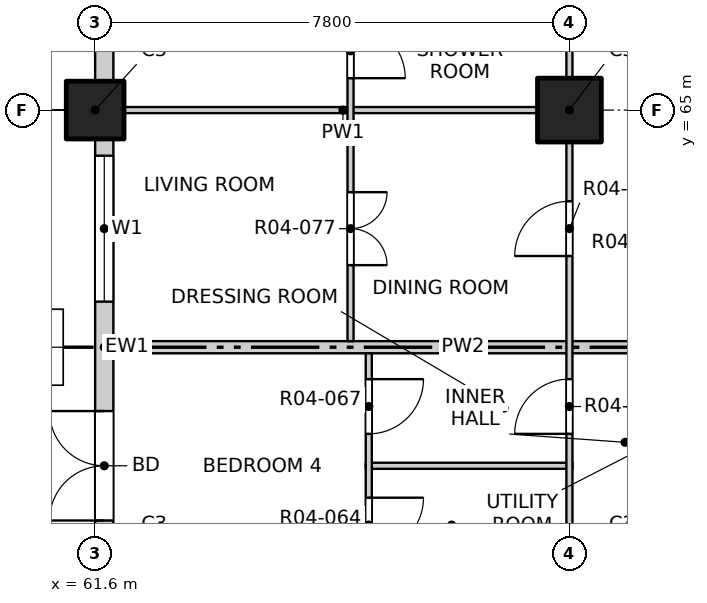
"""IFC4 building model, lengths in metres.
Left out: names, types, materials, properties, quantities, classifications, styles, units other than length and angle.
Written with IfcOpenShell. Run it as: python <this file> out.ifc"""

import sys

from ifc_helpers import new_model, si_unit, direction, frame, frame_2d, origin, origin_2d, place, context, subcontext, project, spatial, rectangle, extrude, element, fill, save


model = new_model("IFC4")
c1 = context("Model", 3, precision=1e-05, world=origin(), true_north=direction((0.0, 1.0)))
c2 = subcontext(c1, "Body", "Model", "MODEL_VIEW")
j1 = project(units=[si_unit("LENGTHUNIT", "METRE"), si_unit("PLANEANGLEUNIT", "RADIAN")], contexts=[c1])
p1 = place(None, origin())
s1 = spatial("IfcSite", under=j1, at=p1, CompositionType="ELEMENT")
p2 = place(p1, origin())
s2 = spatial("IfcBuilding", under=s1, at=p2, CompositionType="ELEMENT")
p3 = place(p2, frame((0.0, 0.0, 58.0)))
s3 = spatial("IfcBuildingStorey", under=s2, at=p3, CompositionType="ELEMENT", Elevation=58.0)
p4 = place(p3, frame((61.6, 65.0, -0.25), z_axis=(0.0, 0.0, 1.0), x_axis=(1.0, 0.0, 0.0)))
e1 = element("IfcColumn", 1, at=p4, inside=s3, PredefinedType="COLUMN", context=c2, shape_type="SweptSolid", body=[
    extrude(rectangle(XDim=0.95, YDim=0.95, at=origin_2d()), origin(), (0.0, 0.0, 1.0), 3.4),
])
p5 = place(p3, frame((69.4, 65.0, -0.25), z_axis=(0.0, 0.0, 1.0), x_axis=(1.0, 0.0, 0.0)))
e2 = element("IfcColumn", 2, at=p5, inside=s3, PredefinedType="COLUMN", context=c2, shape_type="SweptSolid", body=[
    extrude(rectangle(XDim=1.05, YDim=1.05, at=origin_2d()), origin(), (0.0, 0.0, 1.0), 3.4),
])
p6 = place(p3, frame((61.75, 57.675, 0.0), z_axis=(0.0, 0.0, 1.0), x_axis=(0.0, 1.0, 0.0)))
e3 = element("IfcWall", 3, at=p6, inside=s3, PredefinedType="SOLIDWALL", context=c2, shape_type="SweptSolid", body=[
    extrude(rectangle(XDim=6.85, YDim=0.3, at=frame_2d((3.425, 0.0))), origin(), (0.0, 0.0, 1.0), 2.7),
])
p7 = place(p6, frame((0.575, 0.0, 0.0)))
e4 = element("IfcOpeningElement", 4, at=p7, cuts=e3, PredefinedType="OPENING", context=c2, shape_type="SweptSolid", body=[
    extrude(rectangle(XDim=1.8, YDim=2.4, at=frame_2d((0.9, 1.2))), frame((0.0, 0.16, 0.0), z_axis=(0.0, -1.0, 0.0), x_axis=(1.0, 0.0, 0.0)), (0.0, 0.0, 1.0), 0.32),
])
p8 = place(p6, frame((4.175, 0.0, 0.9)))
e5 = element("IfcOpeningElement", 5, at=p8, cuts=e3, PredefinedType="OPENING", context=c2, shape_type="SweptSolid", body=[
    extrude(rectangle(XDim=2.4, YDim=1.8, at=frame_2d((1.2, 0.9))), frame((0.0, 0.16, 0.0), z_axis=(0.0, -1.0, 0.0), x_axis=(1.0, 0.0, 0.0)), (0.0, 0.0, 1.0), 0.32),
])
p9 = place(p3, frame((61.75, 65.475, 0.0), z_axis=(0.0, 0.0, 1.0), x_axis=(0.0, 1.0, 0.0)))
e6 = element("IfcWall", 6, at=p9, inside=s3, PredefinedType="SOLIDWALL", context=c2, shape_type="SweptSolid", body=[
    extrude(rectangle(XDim=6.85, YDim=0.3, at=frame_2d((3.425, 0.0))), origin(), (0.0, 0.0, 1.0), 2.7),
])
p10 = place(p9, frame((0.575, 0.0, 0.0)))
e7 = element("IfcOpeningElement", 7, at=p10, cuts=e6, PredefinedType="OPENING", context=c2, shape_type="SweptSolid", body=[
    extrude(rectangle(XDim=1.8, YDim=2.4, at=frame_2d((0.9, 1.2))), frame((0.0, 0.16, 0.0), z_axis=(0.0, -1.0, 0.0), x_axis=(1.0, 0.0, 0.0)), (0.0, 0.0, 1.0), 0.32),
])
p11 = place(p9, frame((4.175, 0.0, 0.9)))
e8 = element("IfcOpeningElement", 8, at=p11, cuts=e6, PredefinedType="OPENING", context=c2, shape_type="SweptSolid", body=[
    extrude(rectangle(XDim=2.4, YDim=1.8, at=frame_2d((1.2, 0.9))), frame((0.0, 0.16, 0.0), z_axis=(0.0, -1.0, 0.0), x_axis=(1.0, 0.0, 0.0)), (0.0, 0.0, 1.0), 0.32),
])
p12 = place(p3, frame((66.05, 59.15, 0.0), z_axis=(0.0, 0.0, 1.0), x_axis=(1.0, 0.0, 0.0)))
e9 = element("IfcWall", 9, at=p12, inside=s3, PredefinedType="PARTITIONING", context=c2, shape_type="SweptSolid", body=[
    extrude(rectangle(XDim=3.4, YDim=0.1, at=frame_2d((1.7, 0.0))), origin(), (0.0, 0.0, 1.0), 3.15),
])
p13 = place(p3, frame((61.9, 61.1, 0.0), z_axis=(0.0, 0.0, 1.0), x_axis=(1.0, 0.0, 0.0)))
e10 = element("IfcWall", 10, at=p13, inside=s3, PredefinedType="PARTITIONING", context=c2, shape_type="SweptSolid", body=[
    extrude(rectangle(XDim=11.5, YDim=0.2, at=frame_2d((5.75, 0.0))), origin(), (0.0, 0.0, 1.0), 3.15),
])
p14 = place(p3, frame((61.9, 65.0, 0.0), z_axis=(0.0, 0.0, 1.0), x_axis=(1.0, 0.0, 0.0)))
e11 = element("IfcWall", 11, at=p14, inside=s3, PredefinedType="PARTITIONING", context=c2, shape_type="SweptSolid", body=[
    extrude(rectangle(XDim=7.55, YDim=0.1, at=frame_2d((3.775, 0.0))), origin(), (0.0, 0.0, 1.0), 2.55),
])
p15 = place(p3, frame((65.8, 61.2, 0.0), z_axis=(0.0, 0.0, 1.0), x_axis=(0.0, 1.0, 0.0)))
e12 = element("IfcWall", 12, at=p15, inside=s3, PredefinedType="PARTITIONING", context=c2, shape_type="SweptSolid", body=[
    extrude(rectangle(XDim=15.4, YDim=0.1, at=frame_2d((7.7, 0.0))), origin(), (0.0, 0.0, 1.0), 3.15),
])
p16 = place(p15, frame((1.25, 0.0, 0.0)))
e13 = element("IfcOpeningElement", 13, at=p16, cuts=e12, PredefinedType="OPENING", context=c2, shape_type="SweptSolid", body=[
    extrude(rectangle(XDim=1.2, YDim=2.1, at=frame_2d((0.6, 1.05))), frame((0.0, 0.06, 0.0), z_axis=(0.0, -1.0, 0.0), x_axis=(1.0, 0.0, 0.0)), (0.0, 0.0, 1.0), 0.12),
])
p17 = place(p15, frame((4.325, 0.0, 0.0)))
e14 = element("IfcOpeningElement", 14, at=p17, cuts=e12, PredefinedType="OPENING", context=c2, shape_type="SweptSolid", body=[
    extrude(rectangle(XDim=0.9, YDim=2.1, at=frame_2d((0.45, 1.05))), frame((0.0, 0.06, 0.0), z_axis=(0.0, -1.0, 0.0), x_axis=(1.0, 0.0, 0.0)), (0.0, 0.0, 1.0), 0.12),
])
p18 = place(p15, frame((6.275, 0.0, 0.0)))
e15 = element("IfcOpeningElement", 15, at=p18, cuts=e12, PredefinedType="OPENING", context=c2, shape_type="SweptSolid", body=[
    extrude(rectangle(XDim=0.9, YDim=2.1, at=frame_2d((0.45, 1.05))), frame((0.0, 0.06, 0.0), z_axis=(0.0, -1.0, 0.0), x_axis=(1.0, 0.0, 0.0)), (0.0, 0.0, 1.0), 0.12),
])
p19 = place(p15, frame((8.225, 0.0, 0.0)))
e16 = element("IfcOpeningElement", 16, at=p19, cuts=e12, PredefinedType="OPENING", context=c2, shape_type="SweptSolid", body=[
    extrude(rectangle(XDim=0.9, YDim=2.1, at=frame_2d((0.45, 1.05))), frame((0.0, 0.06, 0.0), z_axis=(0.0, -1.0, 0.0), x_axis=(1.0, 0.0, 0.0)), (0.0, 0.0, 1.0), 0.12),
])
p20 = place(p15, frame((10.175, 0.0, 0.0)))
e17 = element("IfcOpeningElement", 17, at=p20, cuts=e12, PredefinedType="OPENING", context=c2, shape_type="SweptSolid", body=[
    extrude(rectangle(XDim=0.9, YDim=2.1, at=frame_2d((0.45, 1.05))), frame((0.0, 0.06, 0.0), z_axis=(0.0, -1.0, 0.0), x_axis=(1.0, 0.0, 0.0)), (0.0, 0.0, 1.0), 0.12),
])
p21 = place(p15, frame((12.125, 0.0, 0.0)))
e18 = element("IfcOpeningElement", 18, at=p21, cuts=e12, PredefinedType="OPENING", context=c2, shape_type="SweptSolid", body=[
    extrude(rectangle(XDim=0.9, YDim=2.1, at=frame_2d((0.45, 1.05))), frame((0.0, 0.06, 0.0), z_axis=(0.0, -1.0, 0.0), x_axis=(1.0, 0.0, 0.0)), (0.0, 0.0, 1.0), 0.12),
])
p22 = place(p15, frame((14.075, 0.0, 0.0)))
e19 = element("IfcOpeningElement", 19, at=p22, cuts=e12, PredefinedType="OPENING", context=c2, shape_type="SweptSolid", body=[
    extrude(rectangle(XDim=0.9, YDim=2.1, at=frame_2d((0.45, 1.05))), frame((0.0, 0.06, 0.0), z_axis=(0.0, -1.0, 0.0), x_axis=(1.0, 0.0, 0.0)), (0.0, 0.0, 1.0), 0.12),
])
p23 = place(p3, frame((66.1, 41.9, 0.0), z_axis=(0.0, 0.0, 1.0), x_axis=(0.0, 1.0, 0.0)))
e20 = element("IfcWall", 20, at=p23, inside=s3, PredefinedType="PARTITIONING", context=c2, shape_type="SweptSolid", body=[
    extrude(rectangle(XDim=19.1, YDim=0.1, at=frame_2d((9.55, 0.0))), origin(), (0.0, 0.0, 1.0), 3.15),
])
p24 = place(p23, frame((1.05, 0.0, 0.0)))
e21 = element("IfcOpeningElement", 21, at=p24, cuts=e20, PredefinedType="OPENING", context=c2, shape_type="SweptSolid", body=[
    extrude(rectangle(XDim=1.2, YDim=2.1, at=frame_2d((0.6, 1.05))), frame((0.0, 0.06, 0.0), z_axis=(0.0, -1.0, 0.0), x_axis=(1.0, 0.0, 0.0)), (0.0, 0.0, 1.0), 0.12),
])
p25 = place(p23, frame((4.125, 0.0, 0.0)))
e22 = element("IfcOpeningElement", 22, at=p25, cuts=e20, PredefinedType="OPENING", context=c2, shape_type="SweptSolid", body=[
    extrude(rectangle(XDim=0.9, YDim=2.1, at=frame_2d((0.45, 1.05))), frame((0.0, 0.06, 0.0), z_axis=(0.0, -1.0, 0.0), x_axis=(1.0, 0.0, 0.0)), (0.0, 0.0, 1.0), 0.12),
])
p26 = place(p23, frame((6.075, 0.0, 0.0)))
e23 = element("IfcOpeningElement", 23, at=p26, cuts=e20, PredefinedType="OPENING", context=c2, shape_type="SweptSolid", body=[
    extrude(rectangle(XDim=0.9, YDim=2.1, at=frame_2d((0.45, 1.05))), frame((0.0, 0.06, 0.0), z_axis=(0.0, -1.0, 0.0), x_axis=(1.0, 0.0, 0.0)), (0.0, 0.0, 1.0), 0.12),
])
p27 = place(p23, frame((8.025, 0.0, 0.0)))
e24 = element("IfcOpeningElement", 24, at=p27, cuts=e20, PredefinedType="OPENING", context=c2, shape_type="SweptSolid", body=[
    extrude(rectangle(XDim=0.9, YDim=2.1, at=frame_2d((0.45, 1.05))), frame((0.0, 0.06, 0.0), z_axis=(0.0, -1.0, 0.0), x_axis=(1.0, 0.0, 0.0)), (0.0, 0.0, 1.0), 0.12),
])
p28 = place(p23, frame((9.975, 0.0, 0.0)))
e25 = element("IfcOpeningElement", 25, at=p28, cuts=e20, PredefinedType="OPENING", context=c2, shape_type="SweptSolid", body=[
    extrude(rectangle(XDim=0.9, YDim=2.1, at=frame_2d((0.45, 1.05))), frame((0.0, 0.06, 0.0), z_axis=(0.0, -1.0, 0.0), x_axis=(1.0, 0.0, 0.0)), (0.0, 0.0, 1.0), 0.12),
])
p29 = place(p23, frame((12.75, 0.0, 0.0)))
e26 = element("IfcOpeningElement", 26, at=p29, cuts=e20, PredefinedType="OPENING", context=c2, shape_type="SweptSolid", body=[
    extrude(rectangle(XDim=1.2, YDim=2.1, at=frame_2d((0.6, 1.05))), frame((0.0, 0.06, 0.0), z_axis=(0.0, -1.0, 0.0), x_axis=(1.0, 0.0, 0.0)), (0.0, 0.0, 1.0), 0.12),
])
p30 = place(p23, frame((15.825, 0.0, 0.0)))
e27 = element("IfcOpeningElement", 27, at=p30, cuts=e20, PredefinedType="OPENING", context=c2, shape_type="SweptSolid", body=[
    extrude(rectangle(XDim=0.9, YDim=2.1, at=frame_2d((0.45, 1.05))), frame((0.0, 0.06, 0.0), z_axis=(0.0, -1.0, 0.0), x_axis=(1.0, 0.0, 0.0)), (0.0, 0.0, 1.0), 0.12),
])
p31 = place(p23, frame((17.775, 0.0, 0.0)))
e28 = element("IfcOpeningElement", 28, at=p31, cuts=e20, PredefinedType="OPENING", context=c2, shape_type="SweptSolid", body=[
    extrude(rectangle(XDim=0.9, YDim=2.1, at=frame_2d((0.45, 1.05))), frame((0.0, 0.06, 0.0), z_axis=(0.0, -1.0, 0.0), x_axis=(1.0, 0.0, 0.0)), (0.0, 0.0, 1.0), 0.12),
])
p32 = place(p3, frame((69.4, 49.4, 0.0), z_axis=(0.0, 0.0, 1.0), x_axis=(0.0, 1.0, 0.0)))
e29 = element("IfcWall", 29, at=p32, inside=s3, PredefinedType="PARTITIONING", context=c2, shape_type="SweptSolid", body=[
    extrude(rectangle(XDim=31.2, YDim=0.1, at=frame_2d((15.6, 0.0))), origin(), (0.0, 0.0, 1.0), 3.15),
])
p33 = place(p32, frame((2.475, 0.0, 0.0)))
e30 = element("IfcOpeningElement", 30, at=p33, cuts=e29, PredefinedType="OPENING", context=c2, shape_type="SweptSolid", body=[
    extrude(rectangle(XDim=0.9, YDim=2.1, at=frame_2d((0.45, 1.05))), frame((0.0, 0.06, 0.0), z_axis=(0.0, -1.0, 0.0), x_axis=(1.0, 0.0, 0.0)), (0.0, 0.0, 1.0), 0.12),
])
p34 = place(p32, frame((5.4, 0.0, 0.0)))
e31 = element("IfcOpeningElement", 31, at=p34, cuts=e29, PredefinedType="OPENING", context=c2, shape_type="SweptSolid", body=[
    extrude(rectangle(XDim=0.9, YDim=2.1, at=frame_2d((0.45, 1.05))), frame((0.0, 0.06, 0.0), z_axis=(0.0, -1.0, 0.0), x_axis=(1.0, 0.0, 0.0)), (0.0, 0.0, 1.0), 0.12),
])
p35 = place(p32, frame((10.275, 0.0, 0.0)))
e32 = element("IfcOpeningElement", 32, at=p35, cuts=e29, PredefinedType="OPENING", context=c2, shape_type="SweptSolid", body=[
    extrude(rectangle(XDim=0.9, YDim=2.1, at=frame_2d((0.45, 1.05))), frame((0.0, 0.06, 0.0), z_axis=(0.0, -1.0, 0.0), x_axis=(1.0, 0.0, 0.0)), (0.0, 0.0, 1.0), 0.12),
])
p36 = place(p32, frame((13.2, 0.0, 0.0)))
e33 = element("IfcOpeningElement", 33, at=p36, cuts=e29, PredefinedType="OPENING", context=c2, shape_type="SweptSolid", body=[
    extrude(rectangle(XDim=0.9, YDim=2.1, at=frame_2d((0.45, 1.05))), frame((0.0, 0.06, 0.0), z_axis=(0.0, -1.0, 0.0), x_axis=(1.0, 0.0, 0.0)), (0.0, 0.0, 1.0), 0.12),
])
p37 = place(p32, frame((18.075, 0.0, 0.0)))
e34 = element("IfcOpeningElement", 34, at=p37, cuts=e29, PredefinedType="OPENING", context=c2, shape_type="SweptSolid", body=[
    extrude(rectangle(XDim=0.9, YDim=2.1, at=frame_2d((0.45, 1.05))), frame((0.0, 0.06, 0.0), z_axis=(0.0, -1.0, 0.0), x_axis=(1.0, 0.0, 0.0)), (0.0, 0.0, 1.0), 0.12),
])
p38 = place(p32, frame((21.8, 0.0, 0.0)))
e35 = element("IfcOpeningElement", 35, at=p38, cuts=e29, PredefinedType="OPENING", context=c2, shape_type="SweptSolid", body=[
    extrude(rectangle(XDim=0.9, YDim=2.1, at=frame_2d((0.45, 1.05))), frame((0.0, 0.06, 0.0), z_axis=(0.0, -1.0, 0.0), x_axis=(1.0, 0.0, 0.0)), (0.0, 0.0, 1.0), 0.12),
])
p39 = place(p32, frame((25.875, 0.0, 0.0)))
e36 = element("IfcOpeningElement", 36, at=p39, cuts=e29, PredefinedType="OPENING", context=c2, shape_type="SweptSolid", body=[
    extrude(rectangle(XDim=0.9, YDim=2.1, at=frame_2d((0.45, 1.05))), frame((0.0, 0.06, 0.0), z_axis=(0.0, -1.0, 0.0), x_axis=(1.0, 0.0, 0.0)), (0.0, 0.0, 1.0), 0.12),
])
p40 = place(p32, frame((29.6, 0.0, 0.0)))
e37 = element("IfcOpeningElement", 37, at=p40, cuts=e29, PredefinedType="OPENING", context=c2, shape_type="SweptSolid", body=[
    extrude(rectangle(XDim=0.9, YDim=2.1, at=frame_2d((0.45, 1.05))), frame((0.0, 0.06, 0.0), z_axis=(0.0, -1.0, 0.0), x_axis=(1.0, 0.0, 0.0)), (0.0, 0.0, 1.0), 0.12),
])
p41 = place(p7, origin())
e38 = element("IfcDoor", 38, at=p41, inside=s3, OperationType="DOUBLE_DOOR_SINGLE_SWING", PredefinedType="DOOR", context=c2, shape_type="SweptSolid", body=[
    extrude(rectangle(XDim=1.8, YDim=2.4, at=frame_2d((0.9, 1.2))), frame((0.0, 0.025, 0.0), z_axis=(0.0, -1.0, 0.0), x_axis=(1.0, 0.0, 0.0)), (0.0, 0.0, 1.0), 0.05),
])
fill(e4, e38)
p42 = place(p8, origin())
e39 = element("IfcWindow", 39, at=p42, inside=s3, PartitioningType="DOUBLE_PANEL_VERTICAL", PredefinedType="WINDOW", context=c2, shape_type="SweptSolid", body=[
    extrude(rectangle(XDim=2.4, YDim=1.8, at=frame_2d((1.2, 0.9))), frame((0.0, 0.03, 0.0), z_axis=(0.0, -1.0, 0.0), x_axis=(1.0, 0.0, 0.0)), (0.0, 0.0, 1.0), 0.06),
])
fill(e5, e39)
p43 = place(p30, origin())
e40 = element("IfcDoor", 40, at=p43, inside=s3, OperationType="SINGLE_SWING_LEFT", PredefinedType="DOOR", context=c2, shape_type="SweptSolid", body=[
    extrude(rectangle(XDim=0.9, YDim=2.1, at=frame_2d((0.45, 1.05))), frame((0.0, 0.025, 0.0), z_axis=(0.0, -1.0, 0.0), x_axis=(1.0, 0.0, 0.0)), (0.0, 0.0, 1.0), 0.05),
])
fill(e27, e40)
p44 = place(p31, origin())
e41 = element("IfcDoor", 41, at=p44, inside=s3, OperationType="SINGLE_SWING_LEFT", PredefinedType="DOOR", context=c2, shape_type="SweptSolid", body=[
    extrude(rectangle(XDim=0.9, YDim=2.1, at=frame_2d((0.45, 1.05))), frame((0.0, 0.025, 0.0), z_axis=(0.0, -1.0, 0.0), x_axis=(1.0, 0.0, 0.0)), (0.0, 0.0, 1.0), 0.05),
])
fill(e28, e41)
p45 = place(p35, origin())
e42 = element("IfcDoor", 42, at=p45, inside=s3, OperationType="SINGLE_SWING_LEFT", PredefinedType="DOOR", context=c2, shape_type="SweptSolid", body=[
    extrude(rectangle(XDim=0.9, YDim=2.1, at=frame_2d((0.45, 1.05))), frame((0.0, 0.025, 0.0), z_axis=(0.0, -1.0, 0.0), x_axis=(1.0, 0.0, 0.0)), (0.0, 0.0, 1.0), 0.05),
])
fill(e32, e42)
p46 = place(p16, origin())
e43 = element("IfcDoor", 43, at=p46, inside=s3, OperationType="DOUBLE_DOOR_SINGLE_SWING", PredefinedType="DOOR", context=c2, shape_type="SweptSolid", body=[
    extrude(rectangle(XDim=1.2, YDim=2.1, at=frame_2d((0.6, 1.05))), frame((0.0, 0.025, 0.0), z_axis=(0.0, -1.0, 0.0), x_axis=(1.0, 0.0, 0.0)), (0.0, 0.0, 1.0), 0.05),
])
fill(e13, e43)
p47 = place(p36, origin())
e44 = element("IfcDoor", 44, at=p47, inside=s3, OperationType="SINGLE_SWING_LEFT", PredefinedType="DOOR", context=c2, shape_type="SweptSolid", body=[
    extrude(rectangle(XDim=0.9, YDim=2.1, at=frame_2d((0.45, 1.05))), frame((0.0, 0.025, 0.0), z_axis=(0.0, -1.0, 0.0), x_axis=(1.0, 0.0, 0.0)), (0.0, 0.0, 1.0), 0.05),
])
fill(e33, e44)
p48 = place(p17, origin())
e45 = element("IfcDoor", 45, at=p48, inside=s3, OperationType="SINGLE_SWING_RIGHT", PredefinedType="DOOR", context=c2, shape_type="SweptSolid", body=[
    extrude(rectangle(XDim=0.9, YDim=2.1, at=frame_2d((0.45, 1.05))), frame((0.0, 0.025, 0.0), z_axis=(0.0, -1.0, 0.0), x_axis=(1.0, 0.0, 0.0)), (0.0, 0.0, 1.0), 0.05),
])
fill(e14, e45)
save(model, sys.argv[1])
